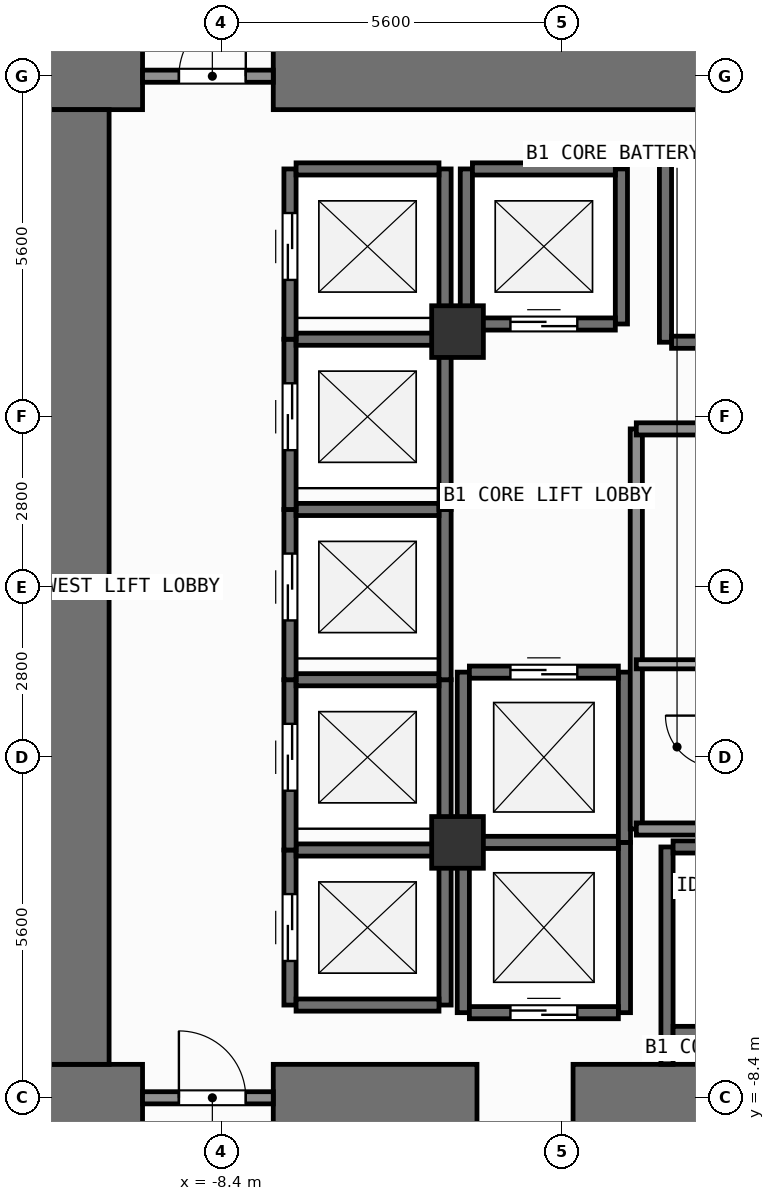
"""IFC4 building model, lengths in metres.
Left out: names, types, materials, properties, quantities, classifications, styles, units other than length and angle.
Written with IfcOpenShell. Run it as: python <this file> out.ifc"""

import sys

from ifc_helpers import new_model, si_unit, direction, frame, frame_2d, origin, origin_2d, place, context, subcontext, project, spatial, rectangle, extrude, element, fill, save


model = new_model("IFC4")
c1 = context("Model", 3, precision=1e-05, world=origin(), true_north=direction((0.0, 1.0)))
c2 = subcontext(c1, "Body", "Model", "MODEL_VIEW")
j1 = project(units=[si_unit("LENGTHUNIT", "METRE"), si_unit("PLANEANGLEUNIT", "RADIAN")], contexts=[c1])
p1 = place(None, origin())
s1 = spatial("IfcSite", under=j1, at=p1, CompositionType="ELEMENT")
p2 = place(p1, origin())
s2 = spatial("IfcBuilding", under=s1, at=p2, CompositionType="ELEMENT")
p3 = place(p2, frame((0.0, 0.0, -4.2)))
s3 = spatial("IfcBuildingStorey", under=s2, at=p3, CompositionType="ELEMENT", Elevation=-4.2)
p4 = place(p3, frame((-11.35, -8.4, 0.0), z_axis=(0.0, 0.0, 1.0), x_axis=(1.0, 0.0, 0.0)))
e1 = element("IfcWall", 1, at=p4, inside=s3, PredefinedType="SHEAR", context=c2, shape_type="SweptSolid", body=[
    extrude(rectangle(XDim=1.65, YDim=1.1, at=frame_2d((0.825, 0.0))), origin(), (0.0, 0.0, 1.0), 4.2),
])
p5 = place(p3, frame((-7.55, -8.4, 0.0), z_axis=(0.0, 0.0, 1.0), x_axis=(1.0, 0.0, 0.0)))
e2 = element("IfcWall", 2, at=p5, inside=s3, PredefinedType="SHEAR", context=c2, shape_type="SweptSolid", body=[
    extrude(rectangle(XDim=3.35, YDim=1.1, at=frame_2d((1.675, 0.0))), origin(), (0.0, 0.0, 1.0), 4.2),
])
p6 = place(p3, frame((-2.62, -8.4, 0.0), z_axis=(0.0, 0.0, 1.0), x_axis=(1.0, 0.0, 0.0)))
e3 = element("IfcWall", 3, at=p6, inside=s3, PredefinedType="SHEAR", context=c2, shape_type="SweptSolid", body=[
    extrude(rectangle(XDim=7.27, YDim=1.1, at=frame_2d((3.635, 0.0))), origin(), (0.0, 0.0, 1.0), 4.2),
])
p7 = place(p3, frame((-11.35, 8.4, 0.0), z_axis=(0.0, 0.0, 1.0), x_axis=(1.0, 0.0, 0.0)))
e4 = element("IfcWall", 4, at=p7, inside=s3, PredefinedType="SHEAR", context=c2, shape_type="SweptSolid", body=[
    extrude(rectangle(XDim=1.65, YDim=1.1, at=frame_2d((0.825, 0.0))), origin(), (0.0, 0.0, 1.0), 4.2),
])
p8 = place(p3, frame((-7.55, 8.4, 0.0), z_axis=(0.0, 0.0, 1.0), x_axis=(1.0, 0.0, 0.0)))
e5 = element("IfcWall", 5, at=p8, inside=s3, PredefinedType="SHEAR", context=c2, shape_type="SweptSolid", body=[
    extrude(rectangle(XDim=16.5, YDim=1.1, at=frame_2d((8.25, 0.0))), origin(), (0.0, 0.0, 1.0), 4.2),
])
p9 = place(p3, frame((-10.8, -7.85, 0.0), z_axis=(0.0, 0.0, 1.0), x_axis=(0.0, 1.0, 0.0)))
e6 = element("IfcWall", 6, at=p9, inside=s3, PredefinedType="SHEAR", context=c2, shape_type="SweptSolid", body=[
    extrude(rectangle(XDim=15.7, YDim=1.1, at=frame_2d((7.85, 0.0))), origin(), (0.0, 0.0, 1.0), 4.2),
])
for number, where, z_axis, x_axis in (
    (7, (-4.52, -4.2, 0.0), (0.0, 0.0, 1.0), (1.0, 0.0, 0.0)),
    (8, (-4.52, 4.2, 0.0), (0.0, 0.0, 1.0), (1.0, 0.0, 0.0)),
):
    element("IfcColumn", number, at=place(p3, frame(where, z_axis=z_axis, x_axis=x_axis)), inside=s3, PredefinedType="COLUMN", context=c2, shape_type="SweptSolid", body=[
        extrude(rectangle(XDim=0.85, YDim=0.85, at=origin_2d()), origin(), (0.0, 0.0, 1.0), 4.2),
    ])
p10 = place(p3, frame((-7.275, -6.875, 0.0), z_axis=(0.0, 0.0, 1.0), x_axis=(0.0, 1.0, 0.0)))
e9 = element("IfcWall", 9, at=p10, inside=s3, PredefinedType="SHEAR", context=c2, shape_type="SweptSolid", body=[
    extrude(rectangle(XDim=2.55, YDim=0.2, at=frame_2d((1.275, 0.0))), origin(), (0.0, 0.0, 1.0), 3.9),
])
p11 = place(p10, frame((0.725, 0.0, 0.0)))
e10 = element("IfcOpeningElement", 10, at=p11, cuts=e9, PredefinedType="OPENING", context=c2, shape_type="SweptSolid", body=[
    extrude(rectangle(XDim=1.1, YDim=2.2, at=frame_2d((0.55, 1.1))), frame((0.0, 0.11, 0.0), z_axis=(0.0, -1.0, 0.0), x_axis=(1.0, 0.0, 0.0)), (0.0, 0.0, 1.0), 0.22),
])
p12 = place(p3, frame((-4.725, -6.875, 0.0), z_axis=(0.0, 0.0, 1.0), x_axis=(0.0, 1.0, 0.0)))
e11 = element("IfcWall", 11, at=p12, inside=s3, PredefinedType="SHEAR", context=c2, shape_type="SweptSolid", body=[
    extrude(rectangle(XDim=2.55, YDim=0.2, at=frame_2d((1.275, 0.0))), origin(), (0.0, 0.0, 1.0), 3.9),
])
for number, where, z_axis, x_axis in (
    (12, (-7.175, -6.875, 0.0), (0.0, 0.0, 1.0), (1.0, 0.0, 0.0)),
    (13, (-7.175, -4.325, 0.0), (0.0, 0.0, 1.0), (1.0, 0.0, 0.0)),
):
    element("IfcWall", number, at=place(p3, frame(where, z_axis=z_axis, x_axis=x_axis)), inside=s3, PredefinedType="SHEAR", context=c2, shape_type="SweptSolid", body=[
        extrude(rectangle(XDim=2.35, YDim=0.2, at=frame_2d((1.175, 0.0))), origin(), (0.0, 0.0, 1.0), 3.9),
    ])
p13 = place(p3, frame((-7.275, -4.325, 0.0), z_axis=(0.0, 0.0, 1.0), x_axis=(0.0, 1.0, 0.0)))
e14 = element("IfcWall", 14, at=p13, inside=s3, PredefinedType="SHEAR", context=c2, shape_type="SweptSolid", body=[
    extrude(rectangle(XDim=2.8, YDim=0.2, at=frame_2d((1.4, 0.0))), origin(), (0.0, 0.0, 1.0), 3.9),
])
p14 = place(p13, frame((0.975, 0.0, 0.0)))
e15 = element("IfcOpeningElement", 15, at=p14, cuts=e14, PredefinedType="OPENING", context=c2, shape_type="SweptSolid", body=[
    extrude(rectangle(XDim=1.1, YDim=2.2, at=frame_2d((0.55, 1.1))), frame((0.0, 0.11, 0.0), z_axis=(0.0, -1.0, 0.0), x_axis=(1.0, 0.0, 0.0)), (0.0, 0.0, 1.0), 0.22),
])
p15 = place(p3, frame((-4.725, -4.325, 0.0), z_axis=(0.0, 0.0, 1.0), x_axis=(0.0, 1.0, 0.0)))
e16 = element("IfcWall", 16, at=p15, inside=s3, PredefinedType="SHEAR", context=c2, shape_type="SweptSolid", body=[
    extrude(rectangle(XDim=2.8, YDim=0.2, at=frame_2d((1.4, 0.0))), origin(), (0.0, 0.0, 1.0), 3.9),
])
p16 = place(p3, frame((-7.175, -1.525, 0.0), z_axis=(0.0, 0.0, 1.0), x_axis=(1.0, 0.0, 0.0)))
e17 = element("IfcWall", 17, at=p16, inside=s3, PredefinedType="SHEAR", context=c2, shape_type="SweptSolid", body=[
    extrude(rectangle(XDim=2.35, YDim=0.2, at=frame_2d((1.175, 0.0))), origin(), (0.0, 0.0, 1.0), 3.9),
])
p17 = place(p3, frame((-7.275, -1.525, 0.0), z_axis=(0.0, 0.0, 1.0), x_axis=(0.0, 1.0, 0.0)))
e18 = element("IfcWall", 18, at=p17, inside=s3, PredefinedType="SHEAR", context=c2, shape_type="SweptSolid", body=[
    extrude(rectangle(XDim=2.8, YDim=0.2, at=frame_2d((1.4, 0.0))), origin(), (0.0, 0.0, 1.0), 3.9),
])
p18 = place(p17, frame((0.975, 0.0, 0.0)))
e19 = element("IfcOpeningElement", 19, at=p18, cuts=e18, PredefinedType="OPENING", context=c2, shape_type="SweptSolid", body=[
    extrude(rectangle(XDim=1.1, YDim=2.2, at=frame_2d((0.55, 1.1))), frame((0.0, 0.11, 0.0), z_axis=(0.0, -1.0, 0.0), x_axis=(1.0, 0.0, 0.0)), (0.0, 0.0, 1.0), 0.22),
])
p19 = place(p3, frame((-4.725, -1.525, 0.0), z_axis=(0.0, 0.0, 1.0), x_axis=(0.0, 1.0, 0.0)))
e20 = element("IfcWall", 20, at=p19, inside=s3, PredefinedType="SHEAR", context=c2, shape_type="SweptSolid", body=[
    extrude(rectangle(XDim=2.8, YDim=0.2, at=frame_2d((1.4, 0.0))), origin(), (0.0, 0.0, 1.0), 3.9),
])
p20 = place(p3, frame((-7.175, 1.275, 0.0), z_axis=(0.0, 0.0, 1.0), x_axis=(1.0, 0.0, 0.0)))
e21 = element("IfcWall", 21, at=p20, inside=s3, PredefinedType="SHEAR", context=c2, shape_type="SweptSolid", body=[
    extrude(rectangle(XDim=2.35, YDim=0.2, at=frame_2d((1.175, 0.0))), origin(), (0.0, 0.0, 1.0), 3.9),
])
p21 = place(p3, frame((-7.275, 1.275, 0.0), z_axis=(0.0, 0.0, 1.0), x_axis=(0.0, 1.0, 0.0)))
e22 = element("IfcWall", 22, at=p21, inside=s3, PredefinedType="SHEAR", context=c2, shape_type="SweptSolid", body=[
    extrude(rectangle(XDim=2.8, YDim=0.2, at=frame_2d((1.4, 0.0))), origin(), (0.0, 0.0, 1.0), 3.9),
])
p22 = place(p21, frame((0.975, 0.0, 0.0)))
e23 = element("IfcOpeningElement", 23, at=p22, cuts=e22, PredefinedType="OPENING", context=c2, shape_type="SweptSolid", body=[
    extrude(rectangle(XDim=1.1, YDim=2.2, at=frame_2d((0.55, 1.1))), frame((0.0, 0.11, 0.0), z_axis=(0.0, -1.0, 0.0), x_axis=(1.0, 0.0, 0.0)), (0.0, 0.0, 1.0), 0.22),
])
p23 = place(p3, frame((-4.725, 1.275, 0.0), z_axis=(0.0, 0.0, 1.0), x_axis=(0.0, 1.0, 0.0)))
e24 = element("IfcWall", 24, at=p23, inside=s3, PredefinedType="SHEAR", context=c2, shape_type="SweptSolid", body=[
    extrude(rectangle(XDim=2.8, YDim=0.2, at=frame_2d((1.4, 0.0))), origin(), (0.0, 0.0, 1.0), 3.9),
])
p24 = place(p3, frame((-7.175, 4.075, 0.0), z_axis=(0.0, 0.0, 1.0), x_axis=(1.0, 0.0, 0.0)))
e25 = element("IfcWall", 25, at=p24, inside=s3, PredefinedType="SHEAR", context=c2, shape_type="SweptSolid", body=[
    extrude(rectangle(XDim=2.35, YDim=0.2, at=frame_2d((1.175, 0.0))), origin(), (0.0, 0.0, 1.0), 3.9),
])
p25 = place(p3, frame((-7.275, 4.075, 0.0), z_axis=(0.0, 0.0, 1.0), x_axis=(0.0, 1.0, 0.0)))
e26 = element("IfcWall", 26, at=p25, inside=s3, PredefinedType="SHEAR", context=c2, shape_type="SweptSolid", body=[
    extrude(rectangle(XDim=2.8, YDim=0.2, at=frame_2d((1.4, 0.0))), origin(), (0.0, 0.0, 1.0), 3.9),
])
p26 = place(p25, frame((0.975, 0.0, 0.0)))
e27 = element("IfcOpeningElement", 27, at=p26, cuts=e26, PredefinedType="OPENING", context=c2, shape_type="SweptSolid", body=[
    extrude(rectangle(XDim=1.1, YDim=2.2, at=frame_2d((0.55, 1.1))), frame((0.0, 0.11, 0.0), z_axis=(0.0, -1.0, 0.0), x_axis=(1.0, 0.0, 0.0)), (0.0, 0.0, 1.0), 0.22),
])
p27 = place(p3, frame((-4.725, 4.075, 0.0), z_axis=(0.0, 0.0, 1.0), x_axis=(0.0, 1.0, 0.0)))
e28 = element("IfcWall", 28, at=p27, inside=s3, PredefinedType="SHEAR", context=c2, shape_type="SweptSolid", body=[
    extrude(rectangle(XDim=2.8, YDim=0.2, at=frame_2d((1.4, 0.0))), origin(), (0.0, 0.0, 1.0), 3.9),
])
p28 = place(p3, frame((-7.175, 6.875, 0.0), z_axis=(0.0, 0.0, 1.0), x_axis=(1.0, 0.0, 0.0)))
e29 = element("IfcWall", 29, at=p28, inside=s3, PredefinedType="SHEAR", context=c2, shape_type="SweptSolid", body=[
    extrude(rectangle(XDim=2.35, YDim=0.2, at=frame_2d((1.175, 0.0))), origin(), (0.0, 0.0, 1.0), 3.9),
])
for number, where, z_axis, x_axis in (
    (30, (-4.375, 4.325, 0.0), (0.0, 0.0, 1.0), (0.0, 1.0, 0.0)),
    (31, (-1.825, 4.325, 0.0), (0.0, 0.0, 1.0), (0.0, 1.0, 0.0)),
):
    element("IfcWall", number, at=place(p3, frame(where, z_axis=z_axis, x_axis=x_axis)), inside=s3, PredefinedType="SHEAR", context=c2, shape_type="SweptSolid", body=[
        extrude(rectangle(XDim=2.55, YDim=0.2, at=frame_2d((1.275, 0.0))), origin(), (0.0, 0.0, 1.0), 3.9),
    ])
p29 = place(p3, frame((-4.275, 4.325, 0.0), z_axis=(0.0, 0.0, 1.0), x_axis=(1.0, 0.0, 0.0)))
e32 = element("IfcWall", 32, at=p29, inside=s3, PredefinedType="SHEAR", context=c2, shape_type="SweptSolid", body=[
    extrude(rectangle(XDim=2.35, YDim=0.2, at=frame_2d((1.175, 0.0))), origin(), (0.0, 0.0, 1.0), 3.9),
])
p30 = place(p29, frame((0.625, 0.0, 0.0)))
e33 = element("IfcOpeningElement", 33, at=p30, cuts=e32, PredefinedType="OPENING", context=c2, shape_type="SweptSolid", body=[
    extrude(rectangle(XDim=1.1, YDim=2.2, at=frame_2d((0.55, 1.1))), frame((0.0, 0.11, 0.0), z_axis=(0.0, -1.0, 0.0), x_axis=(1.0, 0.0, 0.0)), (0.0, 0.0, 1.0), 0.22),
])
p31 = place(p3, frame((-4.275, 6.875, 0.0), z_axis=(0.0, 0.0, 1.0), x_axis=(1.0, 0.0, 0.0)))
e34 = element("IfcWall", 34, at=p31, inside=s3, PredefinedType="SHEAR", context=c2, shape_type="SweptSolid", body=[
    extrude(rectangle(XDim=2.35, YDim=0.2, at=frame_2d((1.175, 0.0))), origin(), (0.0, 0.0, 1.0), 3.9),
])
for number, where, z_axis, x_axis in (
    (35, (-4.425, -7.0, 0.0), (0.0, 0.0, 1.0), (0.0, 1.0, 0.0)),
    (36, (-1.775, -7.0, 0.0), (0.0, 0.0, 1.0), (0.0, 1.0, 0.0)),
):
    element("IfcWall", number, at=place(p3, frame(where, z_axis=z_axis, x_axis=x_axis)), inside=s3, PredefinedType="SHEAR", context=c2, shape_type="SweptSolid", body=[
        extrude(rectangle(XDim=2.8, YDim=0.2, at=frame_2d((1.4, 0.0))), origin(), (0.0, 0.0, 1.0), 3.9),
    ])
p32 = place(p3, frame((-4.325, -7.0, 0.0), z_axis=(0.0, 0.0, 1.0), x_axis=(1.0, 0.0, 0.0)))
e37 = element("IfcWall", 37, at=p32, inside=s3, PredefinedType="SHEAR", context=c2, shape_type="SweptSolid", body=[
    extrude(rectangle(XDim=2.45, YDim=0.2, at=frame_2d((1.225, 0.0))), origin(), (0.0, 0.0, 1.0), 3.9),
])
p33 = place(p32, frame((0.675, 0.0, 0.0)))
e38 = element("IfcOpeningElement", 38, at=p33, cuts=e37, PredefinedType="OPENING", context=c2, shape_type="SweptSolid", body=[
    extrude(rectangle(XDim=1.1, YDim=2.2, at=frame_2d((0.55, 1.1))), frame((0.0, 0.11, 0.0), z_axis=(0.0, -1.0, 0.0), x_axis=(1.0, 0.0, 0.0)), (0.0, 0.0, 1.0), 0.22),
])
p34 = place(p3, frame((-4.325, -4.2, 0.0), z_axis=(0.0, 0.0, 1.0), x_axis=(1.0, 0.0, 0.0)))
e39 = element("IfcWall", 39, at=p34, inside=s3, PredefinedType="SHEAR", context=c2, shape_type="SweptSolid", body=[
    extrude(rectangle(XDim=2.45, YDim=0.2, at=frame_2d((1.225, 0.0))), origin(), (0.0, 0.0, 1.0), 3.9),
])
for number, where, z_axis, x_axis in (
    (40, (-4.425, -4.2, 0.0), (0.0, 0.0, 1.0), (0.0, 1.0, 0.0)),
    (41, (-1.775, -4.2, 0.0), (0.0, 0.0, 1.0), (0.0, 1.0, 0.0)),
):
    element("IfcWall", number, at=place(p3, frame(where, z_axis=z_axis, x_axis=x_axis)), inside=s3, PredefinedType="SHEAR", context=c2, shape_type="SweptSolid", body=[
        extrude(rectangle(XDim=2.8, YDim=0.2, at=frame_2d((1.4, 0.0))), origin(), (0.0, 0.0, 1.0), 3.9),
    ])
p35 = place(p3, frame((-4.325, -1.4, 0.0), z_axis=(0.0, 0.0, 1.0), x_axis=(1.0, 0.0, 0.0)))
e42 = element("IfcWall", 42, at=p35, inside=s3, PredefinedType="SHEAR", context=c2, shape_type="SweptSolid", body=[
    extrude(rectangle(XDim=2.45, YDim=0.2, at=frame_2d((1.225, 0.0))), origin(), (0.0, 0.0, 1.0), 3.9),
])
p36 = place(p35, frame((0.675, 0.0, 0.0)))
e43 = element("IfcOpeningElement", 43, at=p36, cuts=e42, PredefinedType="OPENING", context=c2, shape_type="SweptSolid", body=[
    extrude(rectangle(XDim=1.1, YDim=2.2, at=frame_2d((0.55, 1.1))), frame((0.0, 0.11, 0.0), z_axis=(0.0, -1.0, 0.0), x_axis=(1.0, 0.0, 0.0)), (0.0, 0.0, 1.0), 0.22),
])
p37 = place(p3, frame((-1.1, 4.025, 0.0), z_axis=(0.0, 0.0, 1.0), x_axis=(0.0, 1.0, 0.0)))
e44 = element("IfcWall", 44, at=p37, inside=s3, PredefinedType="SHEAR", context=c2, shape_type="SweptSolid", body=[
    extrude(rectangle(XDim=3.15, YDim=0.2, at=frame_2d((1.575, 0.0))), origin(), (0.0, 0.0, 1.0), 3.9),
])
for number, where, z_axis, x_axis in (
    (45, (-1.0, 4.025, 0.0), (0.0, 0.0, 1.0), (1.0, 0.0, 0.0)),
    (46, (-1.0, 7.175, 0.0), (0.0, 0.0, 1.0), (1.0, 0.0, 0.0)),
):
    element("IfcWall", number, at=place(p3, frame(where, z_axis=z_axis, x_axis=x_axis)), inside=s3, PredefinedType="SHEAR", context=c2, shape_type="SweptSolid", body=[
        extrude(rectangle(XDim=2.4, YDim=0.2, at=frame_2d((1.2, 0.0))), origin(), (0.0, 0.0, 1.0), 3.9),
    ])
p38 = place(p3, frame((-1.075, -7.85, 0.0), z_axis=(0.0, 0.0, 1.0), x_axis=(0.0, 1.0, 0.0)))
e47 = element("IfcWall", 47, at=p38, inside=s3, PredefinedType="SHEAR", context=c2, shape_type="SweptSolid", body=[
    extrude(rectangle(XDim=3.575, YDim=0.2, at=frame_2d((1.788, 0.0))), origin(), (0.0, 0.0, 1.0), 3.9),
])
for number, where, z_axis, x_axis in (
    (48, (-0.975, -7.325, 0.0), (0.0, 0.0, 1.0), (1.0, 0.0, 0.0)),
    (49, (-0.975, -4.275, 0.0), (0.0, 0.0, 1.0), (1.0, 0.0, 0.0)),
):
    element("IfcWall", number, at=place(p3, frame(where, z_axis=z_axis, x_axis=x_axis)), inside=s3, PredefinedType="SHEAR", context=c2, shape_type="SweptSolid", body=[
        extrude(rectangle(XDim=2.35, YDim=0.2, at=frame_2d((1.175, 0.0))), origin(), (0.0, 0.0, 1.0), 3.9),
    ])
p39 = place(p3, frame((-9.7, -8.4, 0.0), z_axis=(0.0, 0.0, 1.0), x_axis=(1.0, 0.0, 0.0)))
e50 = element("IfcWall", 50, at=p39, inside=s3, PredefinedType="SOLIDWALL", context=c2, shape_type="SweptSolid", body=[
    extrude(rectangle(XDim=2.15, YDim=0.2, at=frame_2d((1.075, 0.0))), origin(), (0.0, 0.0, 1.0), 2.94),
])
p40 = place(p39, frame((0.598, 0.0, 0.0)))
e51 = element("IfcOpeningElement", 51, at=p40, cuts=e50, PredefinedType="OPENING", context=c2, shape_type="SweptSolid", body=[
    extrude(rectangle(XDim=1.1, YDim=2.15, at=frame_2d((0.55, 1.075))), frame((0.0, 0.11, 0.0), z_axis=(0.0, -1.0, 0.0), x_axis=(1.0, 0.0, 0.0)), (0.0, 0.0, 1.0), 0.22),
])
p41 = place(p3, frame((-9.7, 8.4, 0.0), z_axis=(0.0, 0.0, 1.0), x_axis=(1.0, 0.0, 0.0)))
e52 = element("IfcWall", 52, at=p41, inside=s3, PredefinedType="SOLIDWALL", context=c2, shape_type="SweptSolid", body=[
    extrude(rectangle(XDim=2.15, YDim=0.2, at=frame_2d((1.075, 0.0))), origin(), (0.0, 0.0, 1.0), 2.94),
])
p42 = place(p41, frame((0.598, 0.0, 0.0)))
e53 = element("IfcOpeningElement", 53, at=p42, cuts=e52, PredefinedType="OPENING", context=c2, shape_type="SweptSolid", body=[
    extrude(rectangle(XDim=1.1, YDim=2.15, at=frame_2d((0.55, 1.075))), frame((0.0, 0.11, 0.0), z_axis=(0.0, -1.0, 0.0), x_axis=(1.0, 0.0, 0.0)), (0.0, 0.0, 1.0), 0.22),
])
p43 = place(p3, frame((-1.58, -3.98, 0.0), z_axis=(0.0, 0.0, 1.0), x_axis=(0.0, 1.0, 0.0)))
e54 = element("IfcWall", 54, at=p43, inside=s3, PredefinedType="SOLIDWALL", context=c2, shape_type="SweptSolid", body=[
    extrude(rectangle(XDim=6.58, YDim=0.2, at=frame_2d((3.29, 0.0))), origin(), (0.0, 0.0, 1.0), 3.9),
])
for number, where, z_axis, x_axis in (
    (55, (-1.58, -3.98, 0.0), (0.0, 0.0, 1.0), (1.0, 0.0, 0.0)),
    (56, (-1.58, 2.6, 0.0), (0.0, 0.0, 1.0), (1.0, 0.0, 0.0)),
):
    element("IfcWall", number, at=place(p3, frame(where, z_axis=z_axis, x_axis=x_axis)), inside=s3, PredefinedType="SOLIDWALL", context=c2, shape_type="SweptSolid", body=[
        extrude(rectangle(XDim=3.19, YDim=0.2, at=frame_2d((1.595, 0.0))), origin(), (0.0, 0.0, 1.0), 3.9),
    ])
p44 = place(p3, frame((-1.58, -1.271, 0.0), z_axis=(0.0, 0.0, 1.0), x_axis=(1.0, 0.0, 0.0)))
e57 = element("IfcWall", 57, at=p44, inside=s3, PredefinedType="PARTITIONING", context=c2, shape_type="SweptSolid", body=[
    extrude(rectangle(XDim=3.19, YDim=0.15, at=frame_2d((1.595, 0.0))), origin(), (0.0, 0.0, 1.0), 3.9),
])
p45 = place(p11, origin())
e58 = element("IfcDoor", 58, at=p45, inside=s3, OperationType="SLIDING_TO_LEFT", PredefinedType="DOOR", context=c2, shape_type="SweptSolid", body=[
    extrude(rectangle(XDim=1.1, YDim=2.2, at=frame_2d((0.55, 1.1))), frame((0.0, 0.025, 0.0), z_axis=(0.0, -1.0, 0.0), x_axis=(1.0, 0.0, 0.0)), (0.0, 0.0, 1.0), 0.05),
])
fill(e10, e58)
p46 = place(p14, origin())
e59 = element("IfcDoor", 59, at=p46, inside=s3, OperationType="SLIDING_TO_LEFT", PredefinedType="DOOR", context=c2, shape_type="SweptSolid", body=[
    extrude(rectangle(XDim=1.1, YDim=2.2, at=frame_2d((0.55, 1.1))), frame((0.0, 0.025, 0.0), z_axis=(0.0, -1.0, 0.0), x_axis=(1.0, 0.0, 0.0)), (0.0, 0.0, 1.0), 0.05),
])
fill(e15, e59)
p47 = place(p18, origin())
e60 = element("IfcDoor", 60, at=p47, inside=s3, OperationType="SLIDING_TO_LEFT", PredefinedType="DOOR", context=c2, shape_type="SweptSolid", body=[
    extrude(rectangle(XDim=1.1, YDim=2.2, at=frame_2d((0.55, 1.1))), frame((0.0, 0.025, 0.0), z_axis=(0.0, -1.0, 0.0), x_axis=(1.0, 0.0, 0.0)), (0.0, 0.0, 1.0), 0.05),
])
fill(e19, e60)
p48 = place(p22, origin())
e61 = element("IfcDoor", 61, at=p48, inside=s3, OperationType="SLIDING_TO_LEFT", PredefinedType="DOOR", context=c2, shape_type="SweptSolid", body=[
    extrude(rectangle(XDim=1.1, YDim=2.2, at=frame_2d((0.55, 1.1))), frame((0.0, 0.025, 0.0), z_axis=(0.0, -1.0, 0.0), x_axis=(1.0, 0.0, 0.0)), (0.0, 0.0, 1.0), 0.05),
])
fill(e23, e61)
p49 = place(p26, origin())
e62 = element("IfcDoor", 62, at=p49, inside=s3, OperationType="SLIDING_TO_LEFT", PredefinedType="DOOR", context=c2, shape_type="SweptSolid", body=[
    extrude(rectangle(XDim=1.1, YDim=2.2, at=frame_2d((0.55, 1.1))), frame((0.0, 0.025, 0.0), z_axis=(0.0, -1.0, 0.0), x_axis=(1.0, 0.0, 0.0)), (0.0, 0.0, 1.0), 0.05),
])
fill(e27, e62)
p50 = place(p30, origin())
e63 = element("IfcDoor", 63, at=p50, inside=s3, OperationType="SLIDING_TO_LEFT", PredefinedType="DOOR", context=c2, shape_type="SweptSolid", body=[
    extrude(rectangle(XDim=1.1, YDim=2.2, at=frame_2d((0.55, 1.1))), frame((0.0, 0.025, 0.0), z_axis=(0.0, -1.0, 0.0), x_axis=(1.0, 0.0, 0.0)), (0.0, 0.0, 1.0), 0.05),
])
fill(e33, e63)
p51 = place(p33, origin())
e64 = element("IfcDoor", 64, at=p51, inside=s3, OperationType="SLIDING_TO_LEFT", PredefinedType="DOOR", context=c2, shape_type="SweptSolid", body=[
    extrude(rectangle(XDim=1.1, YDim=2.2, at=frame_2d((0.55, 1.1))), frame((0.0, 0.025, 0.0), z_axis=(0.0, -1.0, 0.0), x_axis=(1.0, 0.0, 0.0)), (0.0, 0.0, 1.0), 0.05),
])
fill(e38, e64)
p52 = place(p36, origin())
e65 = element("IfcDoor", 65, at=p52, inside=s3, OperationType="SLIDING_TO_LEFT", PredefinedType="DOOR", context=c2, shape_type="SweptSolid", body=[
    extrude(rectangle(XDim=1.1, YDim=2.2, at=frame_2d((0.55, 1.1))), frame((0.0, 0.025, 0.0), z_axis=(0.0, -1.0, 0.0), x_axis=(1.0, 0.0, 0.0)), (0.0, 0.0, 1.0), 0.05),
])
fill(e43, e65)
p53 = place(p40, origin())
e66 = element("IfcDoor", 66, at=p53, inside=s3, OperationType="SINGLE_SWING_LEFT", PredefinedType="DOOR", context=c2, shape_type="SweptSolid", body=[
    extrude(rectangle(XDim=1.1, YDim=2.15, at=frame_2d((0.55, 1.075))), frame((0.0, 0.025, 0.0), z_axis=(0.0, -1.0, 0.0), x_axis=(1.0, 0.0, 0.0)), (0.0, 0.0, 1.0), 0.05),
])
fill(e51, e66)
p54 = place(p42, origin())
e67 = element("IfcDoor", 67, at=p54, inside=s3, OperationType="SINGLE_SWING_RIGHT", PredefinedType="DOOR", context=c2, shape_type="SweptSolid", body=[
    extrude(rectangle(XDim=1.1, YDim=2.15, at=frame_2d((0.55, 1.075))), frame((0.0, 0.025, 0.0), z_axis=(0.0, -1.0, 0.0), x_axis=(1.0, 0.0, 0.0)), (0.0, 0.0, 1.0), 0.05),
])
fill(e53, e67)
save(model, sys.argv[1])
